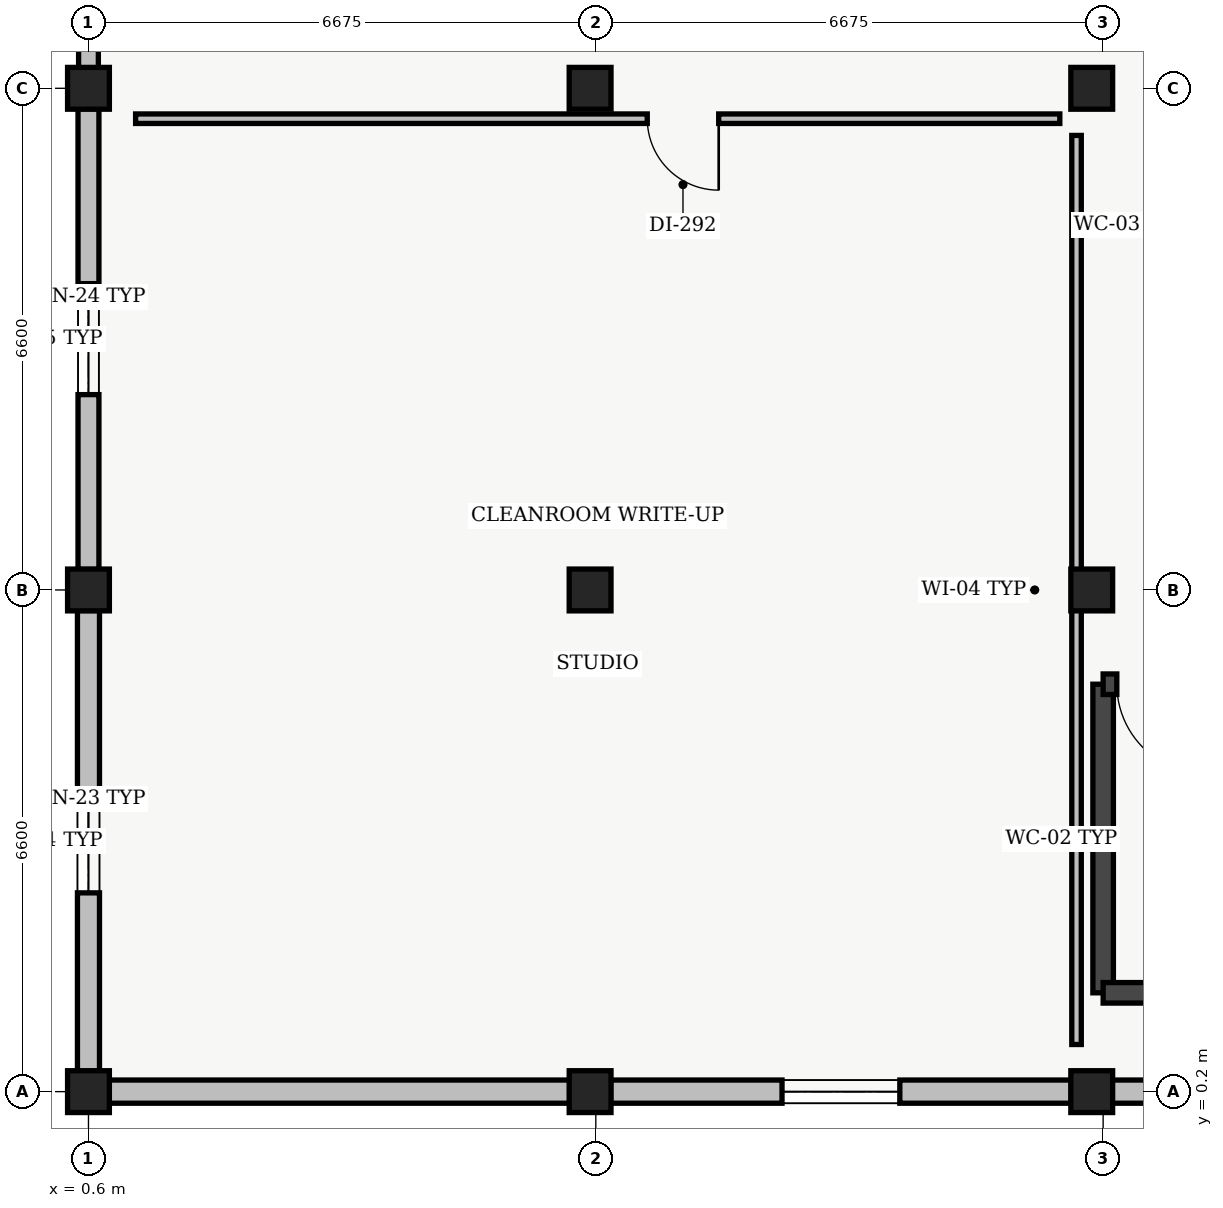
"""IFC4 building model, lengths in metres.
Left out: names, types, materials, properties, quantities, classifications, styles, units other than length and angle.
Written with IfcOpenShell. Run it as: python <this file> out.ifc"""

import sys

from ifc_helpers import new_model, si_unit, direction, frame, frame_2d, origin, origin_2d, place, context, subcontext, project, spatial, rectangle, extrude, element, fill, save


model = new_model("IFC4")
c1 = context("Model", 3, precision=1e-05, world=origin(), true_north=direction((0.0, 1.0)))
c2 = subcontext(c1, "Body", "Model", "MODEL_VIEW")
j1 = project(units=[si_unit("LENGTHUNIT", "METRE"), si_unit("PLANEANGLEUNIT", "RADIAN")], contexts=[c1])
p1 = place(None, origin())
s1 = spatial("IfcSite", under=j1, at=p1, CompositionType="ELEMENT")
p2 = place(p1, origin())
s2 = spatial("IfcBuilding", under=s1, at=p2, CompositionType="ELEMENT")
p3 = place(p2, frame((0.0, 0.0, 14.1)))
s3 = spatial("IfcBuildingStorey", under=s2, at=p3, CompositionType="ELEMENT", Elevation=14.1)
for number, where, z_axis, x_axis in (
    (1, (0.6, 0.2, 0.0), (0.0, 0.0, 1.0), (1.0, 0.0, 0.0)),
    (2, (0.6, 6.8, 0.0), (0.0, 0.0, 1.0), (1.0, 0.0, 0.0)),
    (3, (0.6, 13.4, 0.0), (0.0, 0.0, 1.0), (1.0, 0.0, 0.0)),
    (4, (7.2, 0.2, 0.0), (0.0, 0.0, 1.0), (1.0, 0.0, 0.0)),
    (5, (7.2, 6.8, 0.0), (0.0, 0.0, 1.0), (1.0, 0.0, 0.0)),
    (6, (7.2, 13.4, 0.0), (0.0, 0.0, 1.0), (1.0, 0.0, 0.0)),
    (7, (13.8, 0.2, 0.0), (0.0, 0.0, 1.0), (1.0, 0.0, 0.0)),
    (8, (13.8, 6.8, 0.0), (0.0, 0.0, 1.0), (1.0, 0.0, 0.0)),
    (9, (13.8, 13.4, 0.0), (0.0, 0.0, 1.0), (1.0, 0.0, 0.0)),
):
    element("IfcColumn", number, at=place(p3, frame(where, z_axis=z_axis, x_axis=x_axis)), inside=s3, PredefinedType="COLUMN", context=c2, shape_type="SweptSolid", body=[
        extrude(rectangle(XDim=0.55, YDim=0.55, at=origin_2d()), origin(), (0.0, 0.0, 1.0), 4.3),
    ])
p4 = place(p3, frame((0.6, 0.47, 0.0), z_axis=(0.0, 0.0, 1.0), x_axis=(0.0, 1.0, 0.0)))
e10 = element("IfcWall", 10, at=p4, inside=s3, PredefinedType="STANDARD", context=c2, shape_type="SweptSolid", body=[
    extrude(rectangle(XDim=6.06, YDim=0.29, at=frame_2d((3.03, 0.0))), origin(), (0.0, 0.0, 1.0), 3.785),
])
p5 = place(p4, frame((2.345, 0.0, 0.95)))
e11 = element("IfcOpeningElement", 11, at=p5, cuts=e10, PredefinedType="OPENING", context=c2, shape_type="SweptSolid", body=[
    extrude(rectangle(XDim=1.37, YDim=1.42, at=frame_2d((0.685, 0.71))), frame((0.0, 0.145, 0.0), z_axis=(0.0, -1.0, 0.0), x_axis=(1.0, 0.0, 0.0)), (0.0, 0.0, 1.0), 0.29),
])
p6 = place(p3, frame((0.6, 7.07, 0.0), z_axis=(0.0, 0.0, 1.0), x_axis=(0.0, 1.0, 0.0)))
e12 = element("IfcWall", 12, at=p6, inside=s3, PredefinedType="STANDARD", context=c2, shape_type="SweptSolid", body=[
    extrude(rectangle(XDim=6.06, YDim=0.275, at=frame_2d((3.03, 0.0))), origin(), (0.0, 0.0, 1.0), 3.785),
])
p7 = place(p6, frame((2.3, 0.0, 0.95)))
e13 = element("IfcOpeningElement", 13, at=p7, cuts=e12, PredefinedType="OPENING", context=c2, shape_type="SweptSolid", body=[
    extrude(rectangle(XDim=1.46, YDim=1.44, at=frame_2d((0.73, 0.72))), frame((0.0, 0.137, 0.0), z_axis=(0.0, -1.0, 0.0), x_axis=(1.0, 0.0, 0.0)), (0.0, 0.0, 1.0), 0.275),
])
p8 = place(p3, frame((0.6, 13.67, 0.0), z_axis=(0.0, 0.0, 1.0), x_axis=(0.0, 1.0, 0.0)))
e14 = element("IfcWall", 14, at=p8, inside=s3, PredefinedType="STANDARD", context=c2, shape_type="SweptSolid", body=[
    extrude(rectangle(XDim=6.06, YDim=0.26, at=frame_2d((3.03, 0.0))), origin(), (0.0, 0.0, 1.0), 3.785),
])
p9 = place(p8, frame((2.255, 0.0, 0.95)))
e15 = element("IfcOpeningElement", 15, at=p9, cuts=e14, PredefinedType="OPENING", context=c2, shape_type="SweptSolid", body=[
    extrude(rectangle(XDim=1.55, YDim=1.46, at=frame_2d((0.775, 0.73))), frame((0.0, 0.13, 0.0), z_axis=(0.0, -1.0, 0.0), x_axis=(1.0, 0.0, 0.0)), (0.0, 0.0, 1.0), 0.26),
])
p10 = place(p3, frame((20.13, 0.2, 0.0), z_axis=(0.0, 0.0, 1.0), x_axis=(-1.0, 0.0, 0.0)))
e16 = element("IfcWall", 16, at=p10, inside=s3, PredefinedType="STANDARD", context=c2, shape_type="SweptSolid", body=[
    extrude(rectangle(XDim=6.06, YDim=0.305, at=frame_2d((3.03, 0.0))), origin(), (0.0, 0.0, 1.0), 3.785),
])
p11 = place(p3, frame((13.53, 0.2, 0.0), z_axis=(0.0, 0.0, 1.0), x_axis=(-1.0, 0.0, 0.0)))
e17 = element("IfcWall", 17, at=p11, inside=s3, PredefinedType="STANDARD", context=c2, shape_type="SweptSolid", body=[
    extrude(rectangle(XDim=6.06, YDim=0.305, at=frame_2d((3.03, 0.0))), origin(), (0.0, 0.0, 1.0), 3.785),
])
p12 = place(p11, frame((2.255, 0.0, 0.95)))
e18 = element("IfcOpeningElement", 18, at=p12, cuts=e17, PredefinedType="OPENING", context=c2, shape_type="SweptSolid", body=[
    extrude(rectangle(XDim=1.55, YDim=1.46, at=frame_2d((0.775, 0.73))), frame((0.0, 0.152, 0.0), z_axis=(0.0, -1.0, 0.0), x_axis=(1.0, 0.0, 0.0)), (0.0, 0.0, 1.0), 0.305),
])
p13 = place(p3, frame((6.93, 0.2, 0.0), z_axis=(0.0, 0.0, 1.0), x_axis=(-1.0, 0.0, 0.0)))
e19 = element("IfcWall", 19, at=p13, inside=s3, PredefinedType="STANDARD", context=c2, shape_type="SweptSolid", body=[
    extrude(rectangle(XDim=6.06, YDim=0.305, at=frame_2d((3.03, 0.0))), origin(), (0.0, 0.0, 1.0), 3.785),
])
p14 = place(p3, frame((13.95, 1.5, 0.0), z_axis=(0.0, 0.0, 1.0), x_axis=(0.0, 1.0, 0.0)))
e20 = element("IfcWall", 20, at=p14, inside=s3, PredefinedType="SHEAR", context=c2, shape_type="SweptSolid", body=[
    extrude(rectangle(XDim=4.06, YDim=0.27, at=frame_2d((2.03, 0.0))), origin(), (0.0, 0.0, 1.0), 4.28),
])
p15 = place(p3, frame((13.95, 5.56, 0.0), z_axis=(0.0, 0.0, 1.0), x_axis=(1.0, 0.0, 0.0)))
e21 = element("IfcWall", 21, at=p15, inside=s3, PredefinedType="SHEAR", context=c2, shape_type="SweptSolid", body=[
    extrude(rectangle(XDim=7.47, YDim=0.27, at=frame_2d((3.735, 0.0))), origin(), (0.0, 0.0, 1.0), 4.28),
])
p16 = place(p15, frame((0.18, 0.0, 0.0)))
e22 = element("IfcOpeningElement", 22, at=p16, cuts=e21, PredefinedType="OPENING", context=c2, shape_type="SweptSolid", body=[
    extrude(rectangle(XDim=1.18, YDim=2.15, at=frame_2d((0.59, 1.075))), frame((0.0, 0.135, 0.0), z_axis=(0.0, -1.0, 0.0), x_axis=(1.0, 0.0, 0.0)), (0.0, 0.0, 1.0), 0.27),
])
p17 = place(p3, frame((21.42, 1.5, 0.0), z_axis=(0.0, 0.0, 1.0), x_axis=(-1.0, 0.0, 0.0)))
e23 = element("IfcWall", 23, at=p17, inside=s3, PredefinedType="SHEAR", context=c2, shape_type="SweptSolid", body=[
    extrude(rectangle(XDim=7.47, YDim=0.27, at=frame_2d((3.735, 0.0))), origin(), (0.0, 0.0, 1.0), 4.28),
])
p18 = place(p3, frame((13.6, 0.82, 0.0), z_axis=(0.0, 0.0, 1.0), x_axis=(0.0, 1.0, 0.0)))
e24 = element("IfcWall", 24, at=p18, inside=s3, PredefinedType="PARTITIONING", context=c2, shape_type="SweptSolid", body=[
    extrude(rectangle(XDim=11.96, YDim=0.125, at=frame_2d((5.98, 0.0))), origin(), (0.0, 0.0, 1.0), 3.685),
])
p19 = place(p3, frame((13.38, 13.0, 0.0), z_axis=(0.0, 0.0, 1.0), x_axis=(-1.0, 0.0, 0.0)))
e25 = element("IfcWall", 25, at=p19, inside=s3, PredefinedType="PARTITIONING", context=c2, shape_type="SweptSolid", body=[
    extrude(rectangle(XDim=12.16, YDim=0.125, at=frame_2d((6.08, 0.0))), origin(), (0.0, 0.0, 1.0), 3.95),
])
p20 = place(p19, frame((4.488, 0.0, 0.0)))
e26 = element("IfcOpeningElement", 26, at=p20, cuts=e25, PredefinedType="OPENING", context=c2, shape_type="SweptSolid", body=[
    extrude(rectangle(XDim=0.94, YDim=2.12, at=frame_2d((0.47, 1.06))), frame((0.0, 0.062, 0.0), z_axis=(0.0, -1.0, 0.0), x_axis=(1.0, 0.0, 0.0)), (0.0, 0.0, 1.0), 0.125),
])
p21 = place(p5, origin())
e27 = element("IfcWindow", 27, at=p21, inside=s3, PartitioningType="SINGLE_PANEL", PredefinedType="WINDOW", context=c2, shape_type="SweptSolid", body=[
    extrude(rectangle(XDim=1.37, YDim=1.42, at=frame_2d((0.685, 0.71))), frame((0.0, 0.03, 0.0), z_axis=(0.0, -1.0, 0.0), x_axis=(1.0, 0.0, 0.0)), (0.0, 0.0, 1.0), 0.06),
])
fill(e11, e27)
p22 = place(p7, origin())
e28 = element("IfcWindow", 28, at=p22, inside=s3, PartitioningType="SINGLE_PANEL", PredefinedType="WINDOW", context=c2, shape_type="SweptSolid", body=[
    extrude(rectangle(XDim=1.46, YDim=1.44, at=frame_2d((0.73, 0.72))), frame((0.0, 0.03, 0.0), z_axis=(0.0, -1.0, 0.0), x_axis=(1.0, 0.0, 0.0)), (0.0, 0.0, 1.0), 0.06),
])
fill(e13, e28)
p23 = place(p12, origin())
e29 = element("IfcWindow", 29, at=p23, inside=s3, PartitioningType="SINGLE_PANEL", PredefinedType="WINDOW", context=c2, shape_type="SweptSolid", body=[
    extrude(rectangle(XDim=1.55, YDim=1.46, at=frame_2d((0.775, 0.73))), frame((0.0, 0.03, 0.0), z_axis=(0.0, -1.0, 0.0), x_axis=(1.0, 0.0, 0.0)), (0.0, 0.0, 1.0), 0.06),
])
fill(e18, e29)
p24 = place(p16, origin())
e30 = element("IfcDoor", 30, at=p24, inside=s3, OperationType="SINGLE_SWING_RIGHT", PredefinedType="DOOR", context=c2, shape_type="SweptSolid", body=[
    extrude(rectangle(XDim=1.18, YDim=2.15, at=frame_2d((0.59, 1.075))), frame((0.0, 0.025, 0.0), z_axis=(0.0, -1.0, 0.0), x_axis=(1.0, 0.0, 0.0)), (0.0, 0.0, 1.0), 0.05),
])
fill(e22, e30)
p25 = place(p20, origin())
e31 = element("IfcDoor", 31, at=p25, inside=s3, OperationType="SINGLE_SWING_LEFT", PredefinedType="DOOR", context=c2, shape_type="SweptSolid", body=[
    extrude(rectangle(XDim=0.94, YDim=2.12, at=frame_2d((0.47, 1.06))), frame((0.0, 0.025, 0.0), z_axis=(0.0, -1.0, 0.0), x_axis=(1.0, 0.0, 0.0)), (0.0, 0.0, 1.0), 0.05),
])
fill(e26, e31)
save(model, sys.argv[1])
